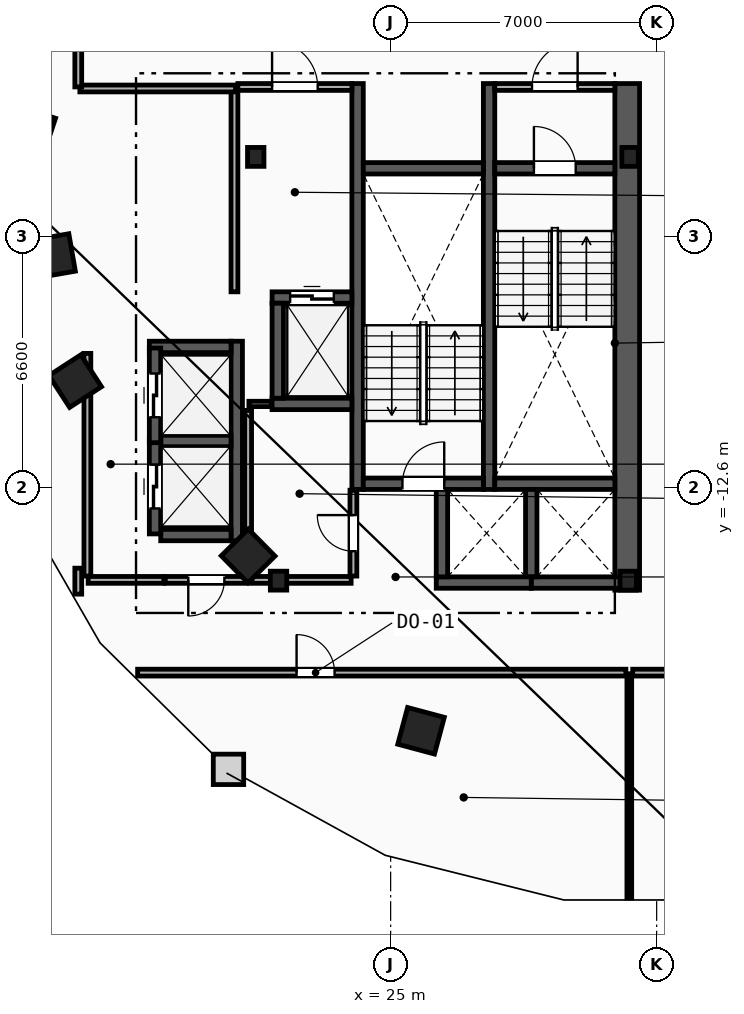
"""IFC4 building model, lengths in metres.
Left out: names, types, materials, properties, quantities, classifications, styles, units other than length and angle.
Written with IfcOpenShell. Run it as: python <this file> out.ifc"""

import sys

from ifc_helpers import new_model, si_unit, direction, frame, frame_2d, origin, origin_2d, place, context, subcontext, project, spatial, rectangle, i_section, extrude, element, fill, save


model = new_model("IFC4")
c1 = context("Model", 3, precision=1e-05, world=origin(), true_north=direction((0.0, 1.0)))
c2 = subcontext(c1, "Body", "Model", "MODEL_VIEW")
j1 = project(units=[si_unit("LENGTHUNIT", "METRE"), si_unit("PLANEANGLEUNIT", "RADIAN")], contexts=[c1])
p1 = place(None, origin())
s1 = spatial("IfcSite", under=j1, at=p1, CompositionType="ELEMENT")
p2 = place(p1, origin())
s2 = spatial("IfcBuilding", under=s1, at=p2, CompositionType="ELEMENT")
p3 = place(p2, frame((0.0, 0.0, 158.4)))
s3 = spatial("IfcBuildingStorey", under=s2, at=p3, CompositionType="ELEMENT", Elevation=158.4)
for number, where, z_axis, x_axis in (
    (1, (31.3, -3.9, 0.0), (0.0, 0.0, 1.0), (1.0, 0.0, 0.0)),
    (2, (21.45, -3.9, 0.0), (0.0, 0.0, 1.0), (1.0, 0.0, 0.0)),
    (3, (22.05, -15.05, 0.0), (0.0, 0.0, 1.0), (1.0, 0.0, 0.0)),
    (4, (31.25, -15.05, 0.0), (0.0, 0.0, 1.0), (1.0, 0.0, 0.0)),
):
    element("IfcColumn", number, at=place(p3, frame(where, z_axis=z_axis, x_axis=x_axis)), inside=s3, PredefinedType="COLUMN", context=c2, shape_type="SweptSolid", body=[
        extrude(i_section(OverallWidth=0.432, OverallDepth=0.498, WebThickness=0.056, FlangeThickness=0.089, FilletRadius=0.018, at=origin_2d()), origin(), (0.0, 0.0, 1.0), 3.6),
    ])
for number, where, z_axis, x_axis in (
    (5, (15.55, -3.2, 0.0), (0.0, 0.0, 1.0), (-0.315, -0.949, 0.0)),
    (6, (16.125, -6.5, 0.0), (0.0, 0.0, 1.0), (0.172, -0.985, 0.0)),
    (7, (16.7, -9.8, 0.0), (0.0, 0.0, 1.0), (0.544, -0.839, 0.0)),
    (8, (21.25, -14.4, 0.0), (0.0, 0.0, 1.0), (0.703, -0.711, 0.0)),
    (9, (25.8, -19.0, 0.0), (0.0, 0.0, 1.0), (0.966, -0.259, 0.0)),
):
    element("IfcColumn", number, at=place(p3, frame(where, z_axis=z_axis, x_axis=x_axis)), inside=s3, PredefinedType="COLUMN", context=c2, shape_type="SweptSolid", body=[
        extrude(rectangle(XDim=1.0, YDim=1.0, at=origin_2d()), origin(), (0.0, 0.0, 1.0), 3.6),
    ])
p4 = place(p3, frame((31.225, -15.3, 0.0), z_axis=(0.0, 0.0, 1.0), x_axis=(0.0, 1.0, 0.0)))
e10 = element("IfcWall", 10, at=p4, inside=s3, PredefinedType="SHEAR", context=c2, shape_type="SweptSolid", body=[
    extrude(rectangle(XDim=13.33, YDim=0.65, at=frame_2d((6.665, 0.0))), origin(), (0.0, 0.0, 1.0), 3.36),
])
for number, where, z_axis, x_axis in (
    (11, (27.59, -12.65, 0.0), (0.0, 0.0, 1.0), (0.0, 1.0, 0.0)),
    (12, (24.13, -12.65, 0.0), (0.0, 0.0, 1.0), (0.0, 1.0, 0.0)),
):
    element("IfcWall", number, at=place(p3, frame(where, z_axis=z_axis, x_axis=x_axis)), inside=s3, PredefinedType="SHEAR", context=c2, shape_type="SweptSolid", body=[
        extrude(rectangle(XDim=10.68, YDim=0.3, at=frame_2d((5.34, 0.0))), origin(), (0.0, 0.0, 1.0), 3.36),
    ])
p5 = place(p3, frame((27.74, -4.2, 0.0), z_axis=(0.0, 0.0, 1.0), x_axis=(1.0, 0.0, 0.0)))
e13 = element("IfcWall", 13, at=p5, inside=s3, PredefinedType="SHEAR", context=c2, shape_type="SweptSolid", body=[
    extrude(rectangle(XDim=3.16, YDim=0.3, at=frame_2d((1.58, 0.0))), origin(), (0.0, 0.0, 1.0), 3.36),
])
p6 = place(p5, frame((1.03, 0.0, 0.0)))
e14 = element("IfcOpeningElement", 14, at=p6, cuts=e13, PredefinedType="OPENING", context=c2, shape_type="SweptSolid", body=[
    extrude(rectangle(XDim=1.1, YDim=2.15, at=frame_2d((0.55, 1.075))), frame((0.0, 0.16, 0.0), z_axis=(0.0, -1.0, 0.0), x_axis=(1.0, 0.0, 0.0)), (0.0, 0.0, 1.0), 0.32),
])
p7 = place(p3, frame((27.74, -12.5, 0.0), z_axis=(0.0, 0.0, 1.0), x_axis=(1.0, 0.0, 0.0)))
e15 = element("IfcWall", 15, at=p7, inside=s3, PredefinedType="SHEAR", context=c2, shape_type="SweptSolid", body=[
    extrude(rectangle(XDim=3.16, YDim=0.3, at=frame_2d((1.58, 0.0))), origin(), (0.0, 0.0, 1.0), 3.36),
])
p8 = place(p3, frame((24.28, -12.5, 0.0), z_axis=(0.0, 0.0, 1.0), x_axis=(1.0, 0.0, 0.0)))
e16 = element("IfcWall", 16, at=p8, inside=s3, PredefinedType="SHEAR", context=c2, shape_type="SweptSolid", body=[
    extrude(rectangle(XDim=3.16, YDim=0.3, at=frame_2d((1.58, 0.0))), origin(), (0.0, 0.0, 1.0), 3.36),
])
p9 = place(p8, frame((1.03, 0.0, 0.0)))
e17 = element("IfcOpeningElement", 17, at=p9, cuts=e16, PredefinedType="OPENING", context=c2, shape_type="SweptSolid", body=[
    extrude(rectangle(XDim=1.1, YDim=2.15, at=frame_2d((0.55, 1.075))), frame((0.0, 0.16, 0.0), z_axis=(0.0, -1.0, 0.0), x_axis=(1.0, 0.0, 0.0)), (0.0, 0.0, 1.0), 0.32),
])
p10 = place(p3, frame((24.28, -4.2, 0.0), z_axis=(0.0, 0.0, 1.0), x_axis=(1.0, 0.0, 0.0)))
e18 = element("IfcWall", 18, at=p10, inside=s3, PredefinedType="SHEAR", context=c2, shape_type="SweptSolid", body=[
    extrude(rectangle(XDim=3.16, YDim=0.3, at=frame_2d((1.58, 0.0))), origin(), (0.0, 0.0, 1.0), 3.36),
])
p11 = place(p3, frame((20.89, -7.45, 0.0), z_axis=(0.0, 0.0, 1.0), x_axis=(0.0, 1.0, 0.0)))
e19 = element("IfcWall", 19, at=p11, inside=s3, PredefinedType="PARTITIONING", context=c2, shape_type="SweptSolid", body=[
    extrude(rectangle(XDim=5.3, YDim=0.18, at=frame_2d((2.65, 0.0))), origin(), (0.0, 0.0, 1.0), 3.36),
])
p12 = place(p3, frame((20.98, -2.06, 0.0), z_axis=(0.0, 0.0, 1.0), x_axis=(1.0, 0.0, 0.0)))
e20 = element("IfcWall", 20, at=p12, inside=s3, PredefinedType="PARTITIONING", context=c2, shape_type="SweptSolid", body=[
    extrude(rectangle(XDim=3.0, YDim=0.18, at=frame_2d((1.5, 0.0))), origin(), (0.0, 0.0, 1.0), 3.36),
])
p13 = place(p12, frame((0.9, 0.0, 0.0)))
e21 = element("IfcOpeningElement", 21, at=p13, cuts=e20, PredefinedType="OPENING", context=c2, shape_type="SweptSolid", body=[
    extrude(rectangle(XDim=1.2, YDim=2.15, at=frame_2d((0.6, 1.075))), frame((0.0, 0.1, 0.0), z_axis=(0.0, -1.0, 0.0), x_axis=(1.0, 0.0, 0.0)), (0.0, 0.0, 1.0), 0.2),
])
p14 = place(p3, frame((27.74, -2.06, 0.0), z_axis=(0.0, 0.0, 1.0), x_axis=(1.0, 0.0, 0.0)))
e22 = element("IfcWall", 22, at=p14, inside=s3, PredefinedType="PARTITIONING", context=c2, shape_type="SweptSolid", body=[
    extrude(rectangle(XDim=3.16, YDim=0.18, at=frame_2d((1.58, 0.0))), origin(), (0.0, 0.0, 1.0), 3.36),
])
p15 = place(p14, frame((0.98, 0.0, 0.0)))
e23 = element("IfcOpeningElement", 23, at=p15, cuts=e22, PredefinedType="OPENING", context=c2, shape_type="SweptSolid", body=[
    extrude(rectangle(XDim=1.2, YDim=2.15, at=frame_2d((0.6, 1.075))), frame((0.0, 0.1, 0.0), z_axis=(0.0, -1.0, 0.0), x_axis=(1.0, 0.0, 0.0)), (0.0, 0.0, 1.0), 0.2),
])
p16 = place(p3, frame((21.88, -7.6, 0.0), z_axis=(0.0, 0.0, 1.0), x_axis=(1.0, 0.0, 0.0)))
e24 = element("IfcWall", 24, at=p16, inside=s3, PredefinedType="SHEAR", context=c2, shape_type="SweptSolid", body=[
    extrude(rectangle(XDim=2.1, YDim=0.3, at=frame_2d((1.05, 0.0))), origin(), (0.0, 0.0, 1.0), 3.36),
])
p17 = place(p16, frame((0.475, 0.0, 0.0)))
e25 = element("IfcOpeningElement", 25, at=p17, cuts=e24, PredefinedType="OPENING", context=c2, shape_type="SweptSolid", body=[
    extrude(rectangle(XDim=1.15, YDim=2.2, at=frame_2d((0.575, 1.1))), frame((0.0, 0.16, 0.0), z_axis=(0.0, -1.0, 0.0), x_axis=(1.0, 0.0, 0.0)), (0.0, 0.0, 1.0), 0.32),
])
p18 = place(p3, frame((21.88, -10.4, 0.0), z_axis=(0.0, 0.0, 1.0), x_axis=(1.0, 0.0, 0.0)))
e26 = element("IfcWall", 26, at=p18, inside=s3, PredefinedType="SHEAR", context=c2, shape_type="SweptSolid", body=[
    extrude(rectangle(XDim=2.1, YDim=0.3, at=frame_2d((1.05, 0.0))), origin(), (0.0, 0.0, 1.0), 3.36),
])
for number, where, z_axis, x_axis in (
    (27, (22.03, -10.25, 0.0), (0.0, 0.0, 1.0), (0.0, 1.0, 0.0)),
    (28, (28.7, -15.1, 0.0), (0.0, 0.0, 1.0), (1.0, 0.0, 0.0)),
):
    element("IfcWall", number, at=place(p3, frame(where, z_axis=z_axis, x_axis=x_axis)), inside=s3, PredefinedType="SHEAR", context=c2, shape_type="SweptSolid", body=[
        extrude(rectangle(XDim=2.5, YDim=0.3, at=frame_2d((1.25, 0.0))), origin(), (0.0, 0.0, 1.0), 3.36),
    ])
p19 = place(p3, frame((28.7, -14.95, 0.0), z_axis=(0.0, 0.0, 1.0), x_axis=(0.0, 1.0, 0.0)))
e29 = element("IfcWall", 29, at=p19, inside=s3, PredefinedType="SHEAR", context=c2, shape_type="SweptSolid", body=[
    extrude(rectangle(XDim=2.3, YDim=0.3, at=frame_2d((1.15, 0.0))), origin(), (0.0, 0.0, 1.0), 3.36),
])
p20 = place(p3, frame((26.2, -15.1, 0.0), z_axis=(0.0, 0.0, 1.0), x_axis=(1.0, 0.0, 0.0)))
e30 = element("IfcWall", 30, at=p20, inside=s3, PredefinedType="SHEAR", context=c2, shape_type="SweptSolid", body=[
    extrude(rectangle(XDim=2.5, YDim=0.3, at=frame_2d((1.25, 0.0))), origin(), (0.0, 0.0, 1.0), 3.36),
])
p21 = place(p3, frame((26.35, -14.95, 0.0), z_axis=(0.0, 0.0, 1.0), x_axis=(0.0, 1.0, 0.0)))
e31 = element("IfcWall", 31, at=p21, inside=s3, PredefinedType="SHEAR", context=c2, shape_type="SweptSolid", body=[
    extrude(rectangle(XDim=2.3, YDim=0.3, at=frame_2d((1.15, 0.0))), origin(), (0.0, 0.0, 1.0), 3.36),
])
p22 = place(p3, frame((20.95, -14.0, 0.0), z_axis=(0.0, 0.0, 1.0), x_axis=(0.0, 1.0, 0.0)))
e32 = element("IfcWall", 32, at=p22, inside=s3, PredefinedType="SHEAR", context=c2, shape_type="SweptSolid", body=[
    extrude(rectangle(XDim=5.25, YDim=0.3, at=frame_2d((2.625, 0.0))), origin(), (0.0, 0.0, 1.0), 3.36),
])
p23 = place(p3, frame((18.95, -13.85, 0.0), z_axis=(0.0, 0.0, 1.0), x_axis=(1.0, 0.0, 0.0)))
e33 = element("IfcWall", 33, at=p23, inside=s3, PredefinedType="SHEAR", context=c2, shape_type="SweptSolid", body=[
    extrude(rectangle(XDim=1.85, YDim=0.3, at=frame_2d((0.925, 0.0))), origin(), (0.0, 0.0, 1.0), 3.36),
])
p24 = place(p3, frame((18.65, -8.9, 0.0), z_axis=(0.0, 0.0, 1.0), x_axis=(1.0, 0.0, 0.0)))
e34 = element("IfcWall", 34, at=p24, inside=s3, PredefinedType="SHEAR", context=c2, shape_type="SweptSolid", body=[
    extrude(rectangle(XDim=2.15, YDim=0.3, at=frame_2d((1.075, 0.0))), origin(), (0.0, 0.0, 1.0), 3.36),
])
p25 = place(p3, frame((18.95, -11.375, 0.0), z_axis=(0.0, 0.0, 1.0), x_axis=(1.0, 0.0, 0.0)))
e35 = element("IfcWall", 35, at=p25, inside=s3, PredefinedType="SHEAR", context=c2, shape_type="SweptSolid", body=[
    extrude(rectangle(XDim=1.85, YDim=0.3, at=frame_2d((0.925, 0.0))), origin(), (0.0, 0.0, 1.0), 3.36),
])
p26 = place(p3, frame((18.8, -13.82, 0.0), z_axis=(0.0, 0.0, 1.0), x_axis=(0.0, 1.0, 0.0)))
e36 = element("IfcWall", 36, at=p26, inside=s3, PredefinedType="SHEAR", context=c2, shape_type="SweptSolid", body=[
    extrude(rectangle(XDim=2.49, YDim=0.3, at=frame_2d((1.245, 0.0))), origin(), (0.0, 0.0, 1.0), 3.36),
])
p27 = place(p26, frame((0.67, 0.0, 0.0)))
e37 = element("IfcOpeningElement", 37, at=p27, cuts=e36, PredefinedType="OPENING", context=c2, shape_type="SweptSolid", body=[
    extrude(rectangle(XDim=1.15, YDim=2.2, at=frame_2d((0.575, 1.1))), frame((0.0, 0.16, 0.0), z_axis=(0.0, -1.0, 0.0), x_axis=(1.0, 0.0, 0.0)), (0.0, 0.0, 1.0), 0.32),
])
p28 = place(p3, frame((18.8, -11.42, 0.0), z_axis=(0.0, 0.0, 1.0), x_axis=(0.0, 1.0, 0.0)))
e38 = element("IfcWall", 38, at=p28, inside=s3, PredefinedType="SHEAR", context=c2, shape_type="SweptSolid", body=[
    extrude(rectangle(XDim=2.49, YDim=0.3, at=frame_2d((1.245, 0.0))), origin(), (0.0, 0.0, 1.0), 3.36),
])
p29 = place(p28, frame((0.67, 0.0, 0.0)))
e39 = element("IfcOpeningElement", 39, at=p29, cuts=e38, PredefinedType="OPENING", context=c2, shape_type="SweptSolid", body=[
    extrude(rectangle(XDim=1.15, YDim=2.2, at=frame_2d((0.575, 1.1))), frame((0.0, 0.16, 0.0), z_axis=(0.0, -1.0, 0.0), x_axis=(1.0, 0.0, 0.0)), (0.0, 0.0, 1.0), 0.32),
])
p30 = place(p3, frame((17.02, -14.93, 0.0), z_axis=(0.0, 0.0, 1.0), x_axis=(0.0, 1.0, 0.0)))
e40 = element("IfcWall", 40, at=p30, inside=s3, PredefinedType="PARTITIONING", context=c2, shape_type="SweptSolid", body=[
    extrude(rectangle(XDim=5.86, YDim=0.18, at=frame_2d((2.93, 0.0))), origin(), (0.0, 0.0, 1.0), 3.36),
])
p31 = place(p3, frame((17.04, -15.03, 0.0), z_axis=(0.0, 0.0, 1.0), x_axis=(1.0, 0.0, 0.0)))
e41 = element("IfcWall", 41, at=p31, inside=s3, PredefinedType="PARTITIONING", context=c2, shape_type="SweptSolid", body=[
    extrude(rectangle(XDim=1.99, YDim=0.18, at=frame_2d((0.995, 0.0))), origin(), (0.0, 0.0, 1.0), 3.36),
])
p32 = place(p3, frame((21.23, -15.03, 0.0), z_axis=(0.0, 0.0, 1.0), x_axis=(-1.0, 0.0, 0.0)))
e42 = element("IfcWall", 42, at=p32, inside=s3, PredefinedType="PARTITIONING", context=c2, shape_type="SweptSolid", body=[
    extrude(rectangle(XDim=2.16, YDim=0.18, at=frame_2d((1.08, 0.0))), origin(), (0.0, 0.0, 1.0), 3.36),
])
p33 = place(p32, frame((0.605, 0.0, 0.0)))
e43 = element("IfcOpeningElement", 43, at=p33, cuts=e42, PredefinedType="OPENING", context=c2, shape_type="SweptSolid", body=[
    extrude(rectangle(XDim=0.95, YDim=2.1, at=frame_2d((0.475, 1.05))), frame((0.0, 0.1, 0.0), z_axis=(0.0, -1.0, 0.0), x_axis=(1.0, 0.0, 0.0)), (0.0, 0.0, 1.0), 0.2),
])
p34 = place(p3, frame((21.27, -10.4, 0.0), z_axis=(0.0, 0.0, 1.0), x_axis=(1.0, 0.0, 0.0)))
e44 = element("IfcWall", 44, at=p34, inside=s3, PredefinedType="PARTITIONING", context=c2, shape_type="SweptSolid", body=[
    extrude(rectangle(XDim=0.59, YDim=0.14, at=frame_2d((0.295, 0.0))), origin(), (0.0, 0.0, 1.0), 3.36),
])
p35 = place(p3, frame((21.25, -14.93, 0.0), z_axis=(0.0, 0.0, 1.0), x_axis=(0.0, 1.0, 0.0)))
e45 = element("IfcWall", 45, at=p35, inside=s3, PredefinedType="PARTITIONING", context=c2, shape_type="SweptSolid", body=[
    extrude(rectangle(XDim=4.36, YDim=0.18, at=frame_2d((2.18, 0.0))), origin(), (0.0, 0.0, 1.0), 3.36),
])
p36 = place(p3, frame((21.35, -15.03, 0.0), z_axis=(0.0, 0.0, 1.0), x_axis=(1.0, 0.0, 0.0)))
e46 = element("IfcWall", 46, at=p36, inside=s3, PredefinedType="PARTITIONING", context=c2, shape_type="SweptSolid", body=[
    extrude(rectangle(XDim=2.61, YDim=0.18, at=frame_2d((1.305, 0.0))), origin(), (0.0, 0.0, 1.0), 2.433),
])
p37 = place(p3, frame((24.02, -14.93, 0.0), z_axis=(0.0, 0.0, 1.0), x_axis=(0.0, 1.0, 0.0)))
e47 = element("IfcWall", 47, at=p37, inside=s3, PredefinedType="PARTITIONING", context=c2, shape_type="SweptSolid", body=[
    extrude(rectangle(XDim=2.26, YDim=0.18, at=frame_2d((1.13, 0.0))), origin(), (0.0, 0.0, 1.0), 3.36),
])
p38 = place(p37, frame((0.655, 0.0, 0.0)))
e48 = element("IfcOpeningElement", 48, at=p38, cuts=e47, PredefinedType="OPENING", context=c2, shape_type="SweptSolid", body=[
    extrude(rectangle(XDim=0.95, YDim=2.1, at=frame_2d((0.475, 1.05))), frame((0.0, 0.1, 0.0), z_axis=(0.0, -1.0, 0.0), x_axis=(1.0, 0.0, 0.0)), (0.0, 0.0, 1.0), 0.2),
])
p39 = place(p3, frame((31.28, -23.402, 0.0), z_axis=(0.0, 0.0, 1.0), x_axis=(0.0, 1.0, 0.0)))
e49 = element("IfcWall", 49, at=p39, inside=s3, PredefinedType="PARTITIONING", context=c2, shape_type="SweptSolid", body=[
    extrude(rectangle(XDim=5.902, YDim=0.125, at=frame_2d((2.951, 0.0))), origin(), (0.0, 0.0, 1.0), 3.36),
])
p40 = place(p3, frame((18.342, -17.47, 0.0), z_axis=(0.0, 0.0, 1.0), x_axis=(1.0, 0.0, 0.0)))
e50 = element("IfcWall", 50, at=p40, inside=s3, PredefinedType="PARTITIONING", context=c2, shape_type="SweptSolid", body=[
    extrude(rectangle(XDim=12.848, YDim=0.18, at=frame_2d((6.424, 0.0))), origin(), (0.0, 0.0, 1.0), 3.36),
])
p41 = place(p40, frame((4.183, 0.0, 0.0)))
e51 = element("IfcOpeningElement", 51, at=p41, cuts=e50, PredefinedType="OPENING", context=c2, shape_type="SweptSolid", body=[
    extrude(rectangle(XDim=1.0, YDim=2.15, at=frame_2d((0.5, 1.075))), frame((0.0, 0.1, 0.0), z_axis=(0.0, -1.0, 0.0), x_axis=(1.0, 0.0, 0.0)), (0.0, 0.0, 1.0), 0.2),
])
p42 = place(p3, frame((31.37, -17.47, 0.0), z_axis=(0.0, 0.0, 1.0), x_axis=(1.0, 0.0, 0.0)))
e52 = element("IfcWall", 52, at=p42, inside=s3, PredefinedType="PARTITIONING", context=c2, shape_type="SweptSolid", body=[
    extrude(rectangle(XDim=2.258, YDim=0.18, at=frame_2d((1.129, 0.0))), origin(), (0.0, 0.0, 1.0), 3.36),
])
p43 = place(p3, frame((16.822, -2.1, 0.0), z_axis=(0.0, 0.0, 1.0), x_axis=(1.0, 0.0, 0.0)))
e53 = element("IfcWall", 53, at=p43, inside=s3, PredefinedType="PARTITIONING", context=c2, shape_type="SweptSolid", body=[
    extrude(rectangle(XDim=4.098, YDim=0.18, at=frame_2d((2.049, 0.0))), origin(), (0.0, 0.0, 1.0), 3.36),
])
p44 = place(p3, frame((16.78, 0.329, 0.0), z_axis=(0.0, 0.0, 1.0), x_axis=(0.0, -1.0, 0.0)))
e54 = element("IfcWall", 54, at=p44, inside=s3, PredefinedType="PARTITIONING", context=c2, shape_type="SweptSolid", body=[
    extrude(rectangle(XDim=2.387, YDim=0.18, at=frame_2d((1.194, 0.0))), origin(), (0.0, 0.0, 1.0), 3.36),
])
p45 = place(p3, frame((16.78, -14.721, 0.0), z_axis=(0.0, 0.0, 1.0), x_axis=(0.0, -1.0, 0.0)))
e55 = element("IfcWall", 55, at=p45, inside=s3, PredefinedType="PARTITIONING", context=c2, shape_type="SweptSolid", body=[
    extrude(rectangle(XDim=0.684, YDim=0.18, at=frame_2d((0.342, 0.0))), origin(), (0.0, 0.0, 1.0), 3.36),
])
p46 = place(p6, origin())
e56 = element("IfcDoor", 56, at=p46, inside=s3, OperationType="SINGLE_SWING_LEFT", PredefinedType="DOOR", context=c2, shape_type="SweptSolid", body=[
    extrude(rectangle(XDim=1.1, YDim=2.15, at=frame_2d((0.55, 1.075))), frame((0.0, 0.025, 0.0), z_axis=(0.0, -1.0, 0.0), x_axis=(1.0, 0.0, 0.0)), (0.0, 0.0, 1.0), 0.05),
])
fill(e14, e56)
p47 = place(p9, origin())
e57 = element("IfcDoor", 57, at=p47, inside=s3, OperationType="SINGLE_SWING_RIGHT", PredefinedType="DOOR", context=c2, shape_type="SweptSolid", body=[
    extrude(rectangle(XDim=1.1, YDim=2.15, at=frame_2d((0.55, 1.075))), frame((0.0, 0.025, 0.0), z_axis=(0.0, -1.0, 0.0), x_axis=(1.0, 0.0, 0.0)), (0.0, 0.0, 1.0), 0.05),
])
fill(e17, e57)
p48 = place(p13, origin())
e58 = element("IfcDoor", 58, at=p48, inside=s3, OperationType="SINGLE_SWING_LEFT", PredefinedType="DOOR", context=c2, shape_type="SweptSolid", body=[
    extrude(rectangle(XDim=1.2, YDim=2.15, at=frame_2d((0.6, 1.075))), frame((0.0, 0.025, 0.0), z_axis=(0.0, -1.0, 0.0), x_axis=(1.0, 0.0, 0.0)), (0.0, 0.0, 1.0), 0.05),
])
fill(e21, e58)
p49 = place(p15, origin())
e59 = element("IfcDoor", 59, at=p49, inside=s3, OperationType="SINGLE_SWING_RIGHT", PredefinedType="DOOR", context=c2, shape_type="SweptSolid", body=[
    extrude(rectangle(XDim=1.2, YDim=2.15, at=frame_2d((0.6, 1.075))), frame((0.0, 0.025, 0.0), z_axis=(0.0, -1.0, 0.0), x_axis=(1.0, 0.0, 0.0)), (0.0, 0.0, 1.0), 0.05),
])
fill(e23, e59)
p50 = place(p17, origin())
e60 = element("IfcDoor", 60, at=p50, inside=s3, OperationType="SLIDING_TO_LEFT", PredefinedType="TRAPDOOR", context=c2, shape_type="SweptSolid", body=[
    extrude(rectangle(XDim=1.15, YDim=2.2, at=frame_2d((0.575, 1.1))), frame((0.0, 0.025, 0.0), z_axis=(0.0, -1.0, 0.0), x_axis=(1.0, 0.0, 0.0)), (0.0, 0.0, 1.0), 0.05),
])
fill(e25, e60)
p51 = place(p27, origin())
e61 = element("IfcDoor", 61, at=p51, inside=s3, OperationType="SLIDING_TO_LEFT", PredefinedType="TRAPDOOR", context=c2, shape_type="SweptSolid", body=[
    extrude(rectangle(XDim=1.15, YDim=2.2, at=frame_2d((0.575, 1.1))), frame((0.0, 0.025, 0.0), z_axis=(0.0, -1.0, 0.0), x_axis=(1.0, 0.0, 0.0)), (0.0, 0.0, 1.0), 0.05),
])
fill(e37, e61)
p52 = place(p29, origin())
e62 = element("IfcDoor", 62, at=p52, inside=s3, OperationType="SLIDING_TO_LEFT", PredefinedType="TRAPDOOR", context=c2, shape_type="SweptSolid", body=[
    extrude(rectangle(XDim=1.15, YDim=2.2, at=frame_2d((0.575, 1.1))), frame((0.0, 0.025, 0.0), z_axis=(0.0, -1.0, 0.0), x_axis=(1.0, 0.0, 0.0)), (0.0, 0.0, 1.0), 0.05),
])
fill(e39, e62)
p53 = place(p41, origin())
e63 = element("IfcDoor", 63, at=p53, inside=s3, OperationType="SINGLE_SWING_LEFT", PredefinedType="DOOR", context=c2, shape_type="SweptSolid", body=[
    extrude(rectangle(XDim=1.0, YDim=2.15, at=frame_2d((0.5, 1.075))), frame((0.0, 0.025, 0.0), z_axis=(0.0, -1.0, 0.0), x_axis=(1.0, 0.0, 0.0)), (0.0, 0.0, 1.0), 0.05),
])
fill(e51, e63)
p54 = place(p38, origin())
e64 = element("IfcDoor", 64, at=p54, inside=s3, OperationType="SINGLE_SWING_RIGHT", PredefinedType="DOOR", context=c2, shape_type="SweptSolid", body=[
    extrude(rectangle(XDim=0.95, YDim=2.1, at=frame_2d((0.475, 1.05))), frame((0.0, 0.025, 0.0), z_axis=(0.0, -1.0, 0.0), x_axis=(1.0, 0.0, 0.0)), (0.0, 0.0, 1.0), 0.05),
])
fill(e48, e64)
p55 = place(p33, origin())
e65 = element("IfcDoor", 65, at=p55, inside=s3, OperationType="SINGLE_SWING_RIGHT", PredefinedType="DOOR", context=c2, shape_type="SweptSolid", body=[
    extrude(rectangle(XDim=0.95, YDim=2.1, at=frame_2d((0.475, 1.05))), frame((0.0, 0.025, 0.0), z_axis=(0.0, -1.0, 0.0), x_axis=(1.0, 0.0, 0.0)), (0.0, 0.0, 1.0), 0.05),
])
fill(e43, e65)
save(model, sys.argv[1])
